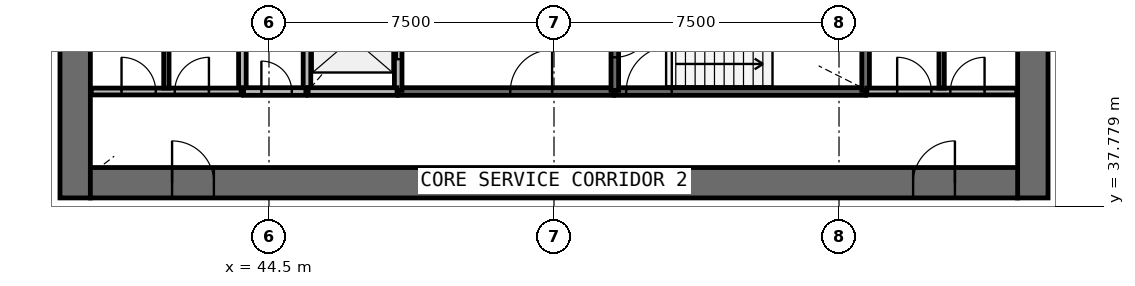
"""IFC4 building model, lengths in metres.
Left out: names, types, materials, properties, quantities, classifications, styles, units other than length and angle.
Written with IfcOpenShell. Run it as: python <this file> out.ifc"""

import sys

from ifc_helpers import new_model, si_unit, direction, frame, frame_2d, origin, place, context, subcontext, project, spatial, rectangle, extrude, source, transform, mapped, element, fill, save


model = new_model("IFC4")
c1 = context("Model", 3, precision=1e-05, world=origin(), true_north=direction((0.0, 1.0)))
c2 = subcontext(c1, "Body", "Model", "MODEL_VIEW")
j1 = project(units=[si_unit("LENGTHUNIT", "METRE"), si_unit("PLANEANGLEUNIT", "RADIAN")], contexts=[c1])
p1 = place(None, origin())
s1 = spatial("IfcSite", under=j1, at=p1, CompositionType="ELEMENT")
p2 = place(p1, origin())
s2 = spatial("IfcBuilding", under=s1, at=p2, CompositionType="ELEMENT")
p3 = place(p2, frame((0.0, 0.0, 112.6)))
s3 = spatial("IfcBuildingStorey", under=s2, at=p3, CompositionType="ELEMENT", Elevation=112.6)
p4 = place(p3, frame((64.6, 38.0, 0.0), z_axis=(0.0, 0.0, 1.0), x_axis=(0.0, 1.0, 0.0)))
e1 = element("IfcWall", 1, at=p4, inside=s3, PredefinedType="SHEAR", context=c2, shape_type="SweptSolid", body=[
    extrude(rectangle(XDim=20.0, YDim=0.8, at=frame_2d((10.0, 0.0))), origin(), (0.0, 0.0, 1.0), 4.1),
])
p5 = place(p4, frame((9.1, 0.0, 0.0)))
e2 = element("IfcOpeningElement", 2, at=p5, cuts=e1, PredefinedType="OPENING", context=c2, shape_type="SweptSolid", body=[
    extrude(rectangle(XDim=1.8, YDim=2.1, at=frame_2d((0.9, 1.05))), frame((0.0, 0.41, 0.0), z_axis=(0.0, -1.0, 0.0), x_axis=(1.0, 0.0, 0.0)), (0.0, 0.0, 1.0), 0.82),
])
p6 = place(p3, frame((39.4, 58.0, 0.0), z_axis=(0.0, 0.0, 1.0), x_axis=(0.0, -1.0, 0.0)))
e3 = element("IfcWall", 3, at=p6, inside=s3, PredefinedType="SHEAR", context=c2, shape_type="SweptSolid", body=[
    extrude(rectangle(XDim=20.0, YDim=0.8, at=frame_2d((10.0, 0.0))), origin(), (0.0, 0.0, 1.0), 4.1),
])
p7 = place(p6, frame((9.1, 0.0, 0.0)))
e4 = element("IfcOpeningElement", 4, at=p7, cuts=e3, PredefinedType="OPENING", context=c2, shape_type="SweptSolid", body=[
    extrude(rectangle(XDim=1.8, YDim=2.1, at=frame_2d((0.9, 1.05))), frame((0.0, 0.41, 0.0), z_axis=(0.0, -1.0, 0.0), x_axis=(1.0, 0.0, 0.0)), (0.0, 0.0, 1.0), 0.82),
])
p8 = place(p3, frame((39.8, 38.4, 0.0), z_axis=(0.0, 0.0, 1.0), x_axis=(1.0, 0.0, 0.0)))
e5 = element("IfcWall", 5, at=p8, inside=s3, PredefinedType="SHEAR", context=c2, shape_type="SweptSolid", body=[
    extrude(rectangle(XDim=24.4, YDim=0.8, at=frame_2d((12.2, 0.0))), origin(), (0.0, 0.0, 1.0), 4.1),
])
p9 = place(p8, frame((21.65, 0.0, 0.0)))
e6 = element("IfcOpeningElement", 6, at=p9, cuts=e5, PredefinedType="OPENING", context=c2, shape_type="SweptSolid", body=[
    extrude(rectangle(XDim=1.1, YDim=2.1, at=frame_2d((0.55, 1.05))), frame((0.0, 0.41, 0.0), z_axis=(0.0, -1.0, 0.0), x_axis=(1.0, 0.0, 0.0)), (0.0, 0.0, 1.0), 0.82),
])
p10 = place(p8, frame((2.15, 0.0, 0.0)))
e7 = element("IfcOpeningElement", 7, at=p10, cuts=e5, PredefinedType="OPENING", context=c2, shape_type="SweptSolid", body=[
    extrude(rectangle(XDim=1.1, YDim=2.1, at=frame_2d((0.55, 1.05))), frame((0.0, 0.41, 0.0), z_axis=(0.0, -1.0, 0.0), x_axis=(1.0, 0.0, 0.0)), (0.0, 0.0, 1.0), 0.82),
])
p11 = place(p3, frame((53.6, 40.8, 0.0), z_axis=(0.0, 0.0, 1.0), x_axis=(1.0, 0.0, 0.0)))
e8 = element("IfcWall", 8, at=p11, inside=s3, PredefinedType="SOLIDWALL", context=c2, shape_type="SweptSolid", body=[
    extrude(rectangle(XDim=6.6, YDim=0.2, at=frame_2d((3.3, 0.0))), origin(), (0.0, 0.0, 1.0), 3.7),
])
p12 = place(p11, frame((0.3, 0.0, 0.0)))
e9 = element("IfcOpeningElement", 9, at=p12, cuts=e8, PredefinedType="OPENING", context=c2, shape_type="SweptSolid", body=[
    extrude(rectangle(XDim=1.2, YDim=2.1, at=frame_2d((0.6, 1.05))), frame((0.0, 0.11, 0.0), z_axis=(0.0, -1.0, 0.0), x_axis=(1.0, 0.0, 0.0)), (0.0, 0.0, 1.0), 0.22),
])
p13 = place(p3, frame((47.9, 40.8, 0.0), z_axis=(0.0, 0.0, 1.0), x_axis=(1.0, 0.0, 0.0)))
e10 = element("IfcWall", 10, at=p13, inside=s3, PredefinedType="SOLIDWALL", context=c2, shape_type="SweptSolid", body=[
    extrude(rectangle(XDim=5.67, YDim=0.2, at=frame_2d((2.835, 0.0))), origin(), (0.0, 0.0, 1.0), 3.7),
])
p14 = place(p13, frame((2.95, 0.0, 0.0)))
e11 = element("IfcOpeningElement", 11, at=p14, cuts=e10, PredefinedType="OPENING", context=c2, shape_type="SweptSolid", body=[
    extrude(rectangle(XDim=1.1, YDim=2.1, at=frame_2d((0.55, 1.05))), frame((0.0, 0.11, 0.0), z_axis=(0.0, -1.0, 0.0), x_axis=(1.0, 0.0, 0.0)), (0.0, 0.0, 1.0), 0.22),
])
for number, where, z_axis, x_axis in (
    (12, (43.8, 43.6, 0.0), (0.0, 0.0, 1.0), (0.0, -1.0, 0.0)),
    (13, (45.5, 43.6, 0.0), (0.0, 0.0, 1.0), (0.0, -1.0, 0.0)),
):
    element("IfcWall", number, at=place(p3, frame(where, z_axis=z_axis, x_axis=x_axis)), inside=s3, PredefinedType="SOLIDWALL", context=c2, shape_type="SweptSolid", body=[
        extrude(rectangle(XDim=2.8, YDim=0.2, at=frame_2d((1.4, 0.0))), origin(), (0.0, 0.0, 1.0), 3.7),
    ])
p15 = place(p3, frame((47.9, 40.83, 0.0), z_axis=(0.0, 0.0, 1.0), x_axis=(0.0, 1.0, 0.0)))
e14 = element("IfcWall", 14, at=p15, inside=s3, PredefinedType="SOLIDWALL", context=c2, shape_type="SweptSolid", body=[
    extrude(rectangle(XDim=2.77, YDim=0.2, at=frame_2d((1.385, 0.0))), origin(), (0.0, 0.0, 1.0), 3.7),
])
p16 = place(p15, frame((0.82, 0.0, 0.0)))
e15 = element("IfcOpeningElement", 15, at=p16, cuts=e14, PredefinedType="OPENING", context=c2, shape_type="SweptSolid", body=[
    extrude(rectangle(XDim=1.1, YDim=2.1, at=frame_2d((0.55, 1.05))), frame((0.0, 0.11, 0.0), z_axis=(0.0, -1.0, 0.0), x_axis=(1.0, 0.0, 0.0)), (0.0, 0.0, 1.0), 0.22),
])
p17 = place(p3, frame((60.2, 40.83, 0.0), z_axis=(0.0, 0.0, 1.0), x_axis=(0.0, 1.0, 0.0)))
e16 = element("IfcWall", 16, at=p17, inside=s3, PredefinedType="SOLIDWALL", context=c2, shape_type="SweptSolid", body=[
    extrude(rectangle(XDim=2.77, YDim=0.2, at=frame_2d((1.385, 0.0))), origin(), (0.0, 0.0, 1.0), 3.7),
])
p18 = place(p3, frame((53.6, 43.6, 0.0), z_axis=(0.0, 0.0, 1.0), x_axis=(0.0, -1.0, 0.0)))
e17 = element("IfcWall", 17, at=p18, inside=s3, PredefinedType="SOLIDWALL", context=c2, shape_type="SweptSolid", body=[
    extrude(rectangle(XDim=2.77, YDim=0.2, at=frame_2d((1.385, 0.0))), origin(), (0.0, 0.0, 1.0), 3.7),
])
p19 = place(p18, frame((0.9, 0.0, 0.0)))
e18 = element("IfcOpeningElement", 18, at=p19, cuts=e17, PredefinedType="OPENING", context=c2, shape_type="SweptSolid", body=[
    extrude(rectangle(XDim=1.0, YDim=2.1, at=frame_2d((0.5, 1.05))), frame((0.0, 0.11, 0.0), z_axis=(0.0, -1.0, 0.0), x_axis=(1.0, 0.0, 0.0)), (0.0, 0.0, 1.0), 0.22),
])
p20 = place(p3, frame((45.53, 40.8, 0.0), z_axis=(0.0, 0.0, 1.0), x_axis=(1.0, 0.0, 0.0)))
e19 = element("IfcWall", 19, at=p20, inside=s3, PredefinedType="SOLIDWALL", context=c2, shape_type="SweptSolid", body=[
    extrude(rectangle(XDim=2.34, YDim=0.2, at=frame_2d((1.17, 0.0))), origin(), (0.0, 0.0, 1.0), 3.7),
])
p21 = place(p3, frame((43.83, 40.8, 0.0), z_axis=(0.0, 0.0, 1.0), x_axis=(1.0, 0.0, 0.0)))
e20 = element("IfcWall", 20, at=p21, inside=s3, PredefinedType="SOLIDWALL", context=c2, shape_type="SweptSolid", body=[
    extrude(rectangle(XDim=1.64, YDim=0.2, at=frame_2d((0.82, 0.0))), origin(), (0.0, 0.0, 1.0), 3.7),
])
p22 = place(p21, frame((0.47, 0.0, 0.0)))
e21 = element("IfcOpeningElement", 21, at=p22, cuts=e20, PredefinedType="OPENING", context=c2, shape_type="SweptSolid", body=[
    extrude(rectangle(XDim=0.8, YDim=2.1, at=frame_2d((0.4, 1.05))), frame((0.0, 0.11, 0.0), z_axis=(0.0, -1.0, 0.0), x_axis=(1.0, 0.0, 0.0)), (0.0, 0.0, 1.0), 0.22),
])
p23 = place(p3, frame((60.23, 40.8, 0.0), z_axis=(0.0, 0.0, 1.0), x_axis=(1.0, 0.0, 0.0)))
e22 = element("IfcWall", 22, at=p23, inside=s3, PredefinedType="PARTITIONING", context=c2, shape_type="SweptSolid", body=[
    extrude(rectangle(XDim=3.95, YDim=0.18, at=frame_2d((1.975, 0.0))), origin(), (0.0, 0.0, 1.0), 3.7),
])
p24 = place(p23, frame((0.8, 0.0, 0.0)))
e23 = element("IfcOpeningElement", 23, at=p24, cuts=e22, PredefinedType="OPENING", context=c2, shape_type="SweptSolid", body=[
    extrude(rectangle(XDim=0.9, YDim=2.1, at=frame_2d((0.45, 1.05))), frame((0.0, 0.1, 0.0), z_axis=(0.0, -1.0, 0.0), x_axis=(1.0, 0.0, 0.0)), (0.0, 0.0, 1.0), 0.2),
])
p25 = place(p23, frame((2.2, 0.0, 0.0)))
e24 = element("IfcOpeningElement", 24, at=p25, cuts=e22, PredefinedType="OPENING", context=c2, shape_type="SweptSolid", body=[
    extrude(rectangle(XDim=0.9, YDim=2.1, at=frame_2d((0.45, 1.05))), frame((0.0, 0.1, 0.0), z_axis=(0.0, -1.0, 0.0), x_axis=(1.0, 0.0, 0.0)), (0.0, 0.0, 1.0), 0.2),
])
p26 = place(p3, frame((39.82, 40.8, 0.0), z_axis=(0.0, 0.0, 1.0), x_axis=(1.0, 0.0, 0.0)))
e25 = element("IfcWall", 25, at=p26, inside=s3, PredefinedType="PARTITIONING", context=c2, shape_type="SweptSolid", body=[
    extrude(rectangle(XDim=3.95, YDim=0.18, at=frame_2d((1.975, 0.0))), origin(), (0.0, 0.0, 1.0), 3.7),
])
p27 = place(p26, frame((0.8, 0.0, 0.0)))
e26 = element("IfcOpeningElement", 26, at=p27, cuts=e25, PredefinedType="OPENING", context=c2, shape_type="SweptSolid", body=[
    extrude(rectangle(XDim=0.9, YDim=2.1, at=frame_2d((0.45, 1.05))), frame((0.0, 0.1, 0.0), z_axis=(0.0, -1.0, 0.0), x_axis=(1.0, 0.0, 0.0)), (0.0, 0.0, 1.0), 0.2),
])
p28 = place(p26, frame((2.2, 0.0, 0.0)))
e27 = element("IfcOpeningElement", 27, at=p28, cuts=e25, PredefinedType="OPENING", context=c2, shape_type="SweptSolid", body=[
    extrude(rectangle(XDim=0.9, YDim=2.1, at=frame_2d((0.45, 1.05))), frame((0.0, 0.1, 0.0), z_axis=(0.0, -1.0, 0.0), x_axis=(1.0, 0.0, 0.0)), (0.0, 0.0, 1.0), 0.2),
])
for number, where, z_axis, x_axis in (
    (28, (41.8, 40.89, 0.0), (0.0, 0.0, 1.0), (0.0, 1.0, 0.0)),
    (29, (62.2, 40.89, 0.0), (0.0, 0.0, 1.0), (0.0, 1.0, 0.0)),
):
    element("IfcWall", number, at=place(p3, frame(where, z_axis=z_axis, x_axis=x_axis)), inside=s3, PredefinedType="PARTITIONING", context=c2, shape_type="SweptSolid", body=[
        extrude(rectangle(XDim=2.71, YDim=0.14, at=frame_2d((1.355, 0.0))), origin(), (0.0, 0.0, 1.0), 2.9),
    ])
m1 = source(origin(), c2, "Body", "SweptSolid", [
    extrude(rectangle(XDim=1.1, YDim=2.1, at=frame_2d((0.55, 1.05))), frame((0.0, 0.025, 0.0), z_axis=(0.0, -1.0, 0.0), x_axis=(1.0, 0.0, 0.0)), (0.0, 0.0, 1.0), 0.05),
])
p29 = place(p16, origin())
e30 = element("IfcDoor", 30, at=p29, inside=s3, OperationType="DOUBLE_DOOR_SLIDING", PredefinedType="USERDEFINED", context=c2, shape_type="MappedRepresentation", body=[
    mapped(m1, transform((0.0, 0.0, 0.0), scale=1.0)),
])
fill(e15, e30)
m2 = source(origin(), c2, "Body", "SweptSolid", [
    extrude(rectangle(XDim=1.2, YDim=2.1, at=frame_2d((0.6, 1.05))), frame((0.0, 0.025, 0.0), z_axis=(0.0, -1.0, 0.0), x_axis=(1.0, 0.0, 0.0)), (0.0, 0.0, 1.0), 0.05),
])
p30 = place(p12, origin())
e31 = element("IfcDoor", 31, at=p30, inside=s3, OperationType="SINGLE_SWING_RIGHT", PredefinedType="DOOR", context=c2, shape_type="MappedRepresentation", body=[
    mapped(m2, transform((0.0, 0.0, 0.0), scale=1.0)),
])
fill(e9, e31)
m3 = source(origin(), c2, "Body", "SweptSolid", [
    extrude(rectangle(XDim=1.0, YDim=2.1, at=frame_2d((0.5, 1.05))), frame((0.0, 0.025, 0.0), z_axis=(0.0, -1.0, 0.0), x_axis=(1.0, 0.0, 0.0)), (0.0, 0.0, 1.0), 0.05),
])
p31 = place(p19, origin())
e32 = element("IfcDoor", 32, at=p31, inside=s3, OperationType="SINGLE_SWING_LEFT", PredefinedType="DOOR", context=c2, shape_type="MappedRepresentation", body=[
    mapped(m3, transform((0.0, 0.0, 0.0), scale=1.0)),
])
fill(e18, e32)
m4 = source(origin(), c2, "Body", "SweptSolid", [
    extrude(rectangle(XDim=1.1, YDim=2.1, at=frame_2d((0.55, 1.05))), frame((0.0, 0.025, 0.0), z_axis=(0.0, -1.0, 0.0), x_axis=(1.0, 0.0, 0.0)), (0.0, 0.0, 1.0), 0.05),
])
p32 = place(p14, origin())
e33 = element("IfcDoor", 33, at=p32, inside=s3, OperationType="SINGLE_SWING_RIGHT", PredefinedType="DOOR", context=c2, shape_type="MappedRepresentation", body=[
    mapped(m4, transform((0.0, 0.0, 0.0), scale=1.0)),
])
fill(e11, e33)
m5 = source(origin(), c2, "Body", "SweptSolid", [
    extrude(rectangle(XDim=0.8, YDim=2.1, at=frame_2d((0.4, 1.05))), frame((0.0, 0.025, 0.0), z_axis=(0.0, -1.0, 0.0), x_axis=(1.0, 0.0, 0.0)), (0.0, 0.0, 1.0), 0.05),
])
p33 = place(p22, origin())
e34 = element("IfcDoor", 34, at=p33, inside=s3, OperationType="SINGLE_SWING_LEFT", PredefinedType="DOOR", context=c2, shape_type="MappedRepresentation", body=[
    mapped(m5, transform((0.0, 0.0, 0.0), scale=1.0)),
])
fill(e21, e34)
m6 = source(origin(), c2, "Body", "SweptSolid", [
    extrude(rectangle(XDim=1.1, YDim=2.1, at=frame_2d((0.55, 1.05))), frame((0.0, 0.025, 0.0), z_axis=(0.0, -1.0, 0.0), x_axis=(1.0, 0.0, 0.0)), (0.0, 0.0, 1.0), 0.05),
])
p34 = place(p9, origin())
e35 = element("IfcDoor", 35, at=p34, inside=s3, OperationType="SINGLE_SWING_RIGHT", PredefinedType="DOOR", context=c2, shape_type="MappedRepresentation", body=[
    mapped(m6, transform((0.0, 0.0, 0.0), scale=1.0)),
])
fill(e6, e35)
p35 = place(p10, origin())
e36 = element("IfcDoor", 36, at=p35, inside=s3, OperationType="SINGLE_SWING_LEFT", PredefinedType="DOOR", context=c2, shape_type="MappedRepresentation", body=[
    mapped(m6, transform((0.0, 0.0, 0.0), scale=1.0)),
])
fill(e7, e36)
m7 = source(origin(), c2, "Body", "SweptSolid", [
    extrude(rectangle(XDim=0.9, YDim=2.1, at=frame_2d((0.45, 1.05))), frame((0.0, 0.025, 0.0), z_axis=(0.0, -1.0, 0.0), x_axis=(1.0, 0.0, 0.0)), (0.0, 0.0, 1.0), 0.05),
])
p36 = place(p27, origin())
e37 = element("IfcDoor", 37, at=p36, inside=s3, OperationType="SINGLE_SWING_LEFT", PredefinedType="DOOR", context=c2, shape_type="MappedRepresentation", body=[
    mapped(m7, transform((0.0, 0.0, 0.0), scale=1.0)),
])
fill(e26, e37)
p37 = place(p28, origin())
e38 = element("IfcDoor", 38, at=p37, inside=s3, OperationType="SINGLE_SWING_RIGHT", PredefinedType="DOOR", context=c2, shape_type="MappedRepresentation", body=[
    mapped(m7, transform((0.0, 0.0, 0.0), scale=1.0)),
])
fill(e27, e38)
p38 = place(p24, origin())
e39 = element("IfcDoor", 39, at=p38, inside=s3, OperationType="SINGLE_SWING_LEFT", PredefinedType="DOOR", context=c2, shape_type="MappedRepresentation", body=[
    mapped(m7, transform((0.0, 0.0, 0.0), scale=1.0)),
])
fill(e23, e39)
p39 = place(p25, origin())
e40 = element("IfcDoor", 40, at=p39, inside=s3, OperationType="SINGLE_SWING_RIGHT", PredefinedType="DOOR", context=c2, shape_type="MappedRepresentation", body=[
    mapped(m7, transform((0.0, 0.0, 0.0), scale=1.0)),
])
fill(e24, e40)
save(model, sys.argv[1])
